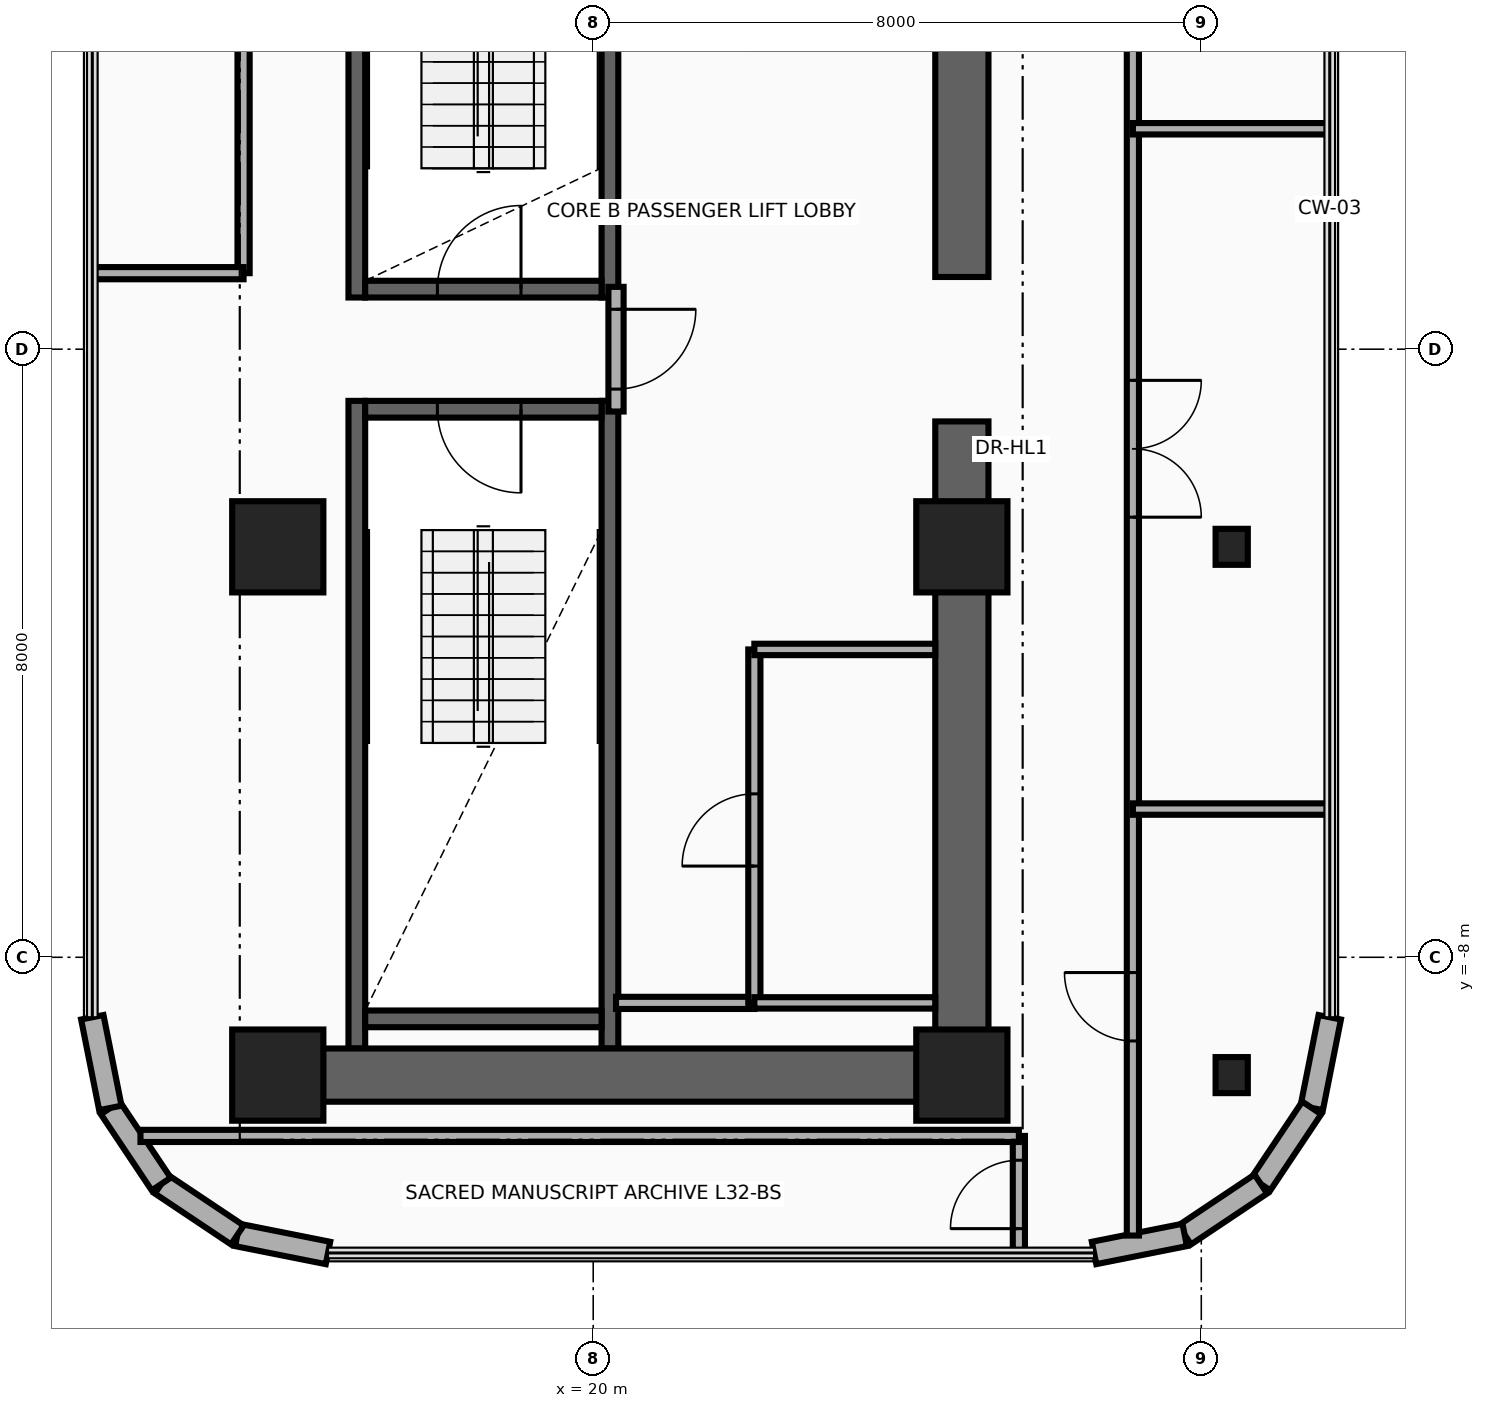
"""IFC4 building model, lengths in metres.
Left out: names, types, materials, properties, quantities, classifications, styles, units other than length and angle.
Written with IfcOpenShell. Run it as: python <this file> out.ifc"""

import sys

from ifc_helpers import new_model, si_unit, direction, frame, frame_2d, origin, origin_2d, place, context, subcontext, project, spatial, rectangle, i_section, extrude, source, transform, mapped, element, fill, save


model = new_model("IFC4")
c1 = context("Model", 3, precision=1e-05, world=origin(), true_north=direction((0.0, 1.0)))
c2 = subcontext(c1, "Body", "Model", "MODEL_VIEW")
j1 = project(units=[si_unit("LENGTHUNIT", "METRE"), si_unit("PLANEANGLEUNIT", "RADIAN")], contexts=[c1])
p1 = place(None, origin())
s1 = spatial("IfcSite", under=j1, at=p1, CompositionType="ELEMENT")
p2 = place(p1, origin())
s2 = spatial("IfcBuilding", under=s1, at=p2, CompositionType="ELEMENT")
p3 = place(p2, frame((0.0, 0.0, 127.9)))
s3 = spatial("IfcBuildingStorey", under=s2, at=p3, CompositionType="ELEMENT", Elevation=127.9)
for number, where, z_axis, x_axis in (
    (1, (16.89, 0.68, 0.0), (0.0, 0.0, 1.0), (0.0, 1.0, 0.0)),
    (2, (20.22, 0.68, 0.0), (0.0, 0.0, 1.0), (0.0, 1.0, 0.0)),
):
    element("IfcWall", number, at=place(p3, frame(where, z_axis=z_axis, x_axis=x_axis)), inside=s3, PredefinedType="SHEAR", context=c2, shape_type="SweptSolid", body=[
        extrude(rectangle(XDim=8.52, YDim=0.22, at=frame_2d((4.26, 0.0))), origin(), (0.0, 0.0, 1.0), 3.46),
    ])
p4 = place(p3, frame((17.0, 0.79, 0.0), z_axis=(0.0, 0.0, 1.0), x_axis=(1.0, 0.0, 0.0)))
e3 = element("IfcWall", 3, at=p4, inside=s3, PredefinedType="SHEAR", context=c2, shape_type="SweptSolid", body=[
    extrude(rectangle(XDim=3.11, YDim=0.22, at=frame_2d((1.555, 0.0))), origin(), (0.0, 0.0, 1.0), 3.46),
])
p5 = place(p4, frame((0.95, 0.0, 0.0)))
e4 = element("IfcOpeningElement", 4, at=p5, cuts=e3, PredefinedType="OPENING", context=c2, shape_type="SweptSolid", body=[
    extrude(rectangle(XDim=1.1, YDim=2.15, at=frame_2d((0.55, 1.075))), frame((0.0, 0.125, 0.0), z_axis=(0.0, -1.0, 0.0), x_axis=(1.0, 0.0, 0.0)), (0.0, 0.0, 1.0), 0.25),
])
for number, where, z_axis, x_axis in (
    (5, (16.89, -9.2, 0.0), (0.0, 0.0, 1.0), (0.0, 1.0, 0.0)),
    (6, (20.22, -9.2, 0.0), (0.0, 0.0, 1.0), (0.0, 1.0, 0.0)),
):
    element("IfcWall", number, at=place(p3, frame(where, z_axis=z_axis, x_axis=x_axis)), inside=s3, PredefinedType="SHEAR", context=c2, shape_type="SweptSolid", body=[
        extrude(rectangle(XDim=8.52, YDim=0.22, at=frame_2d((4.26, 0.0))), origin(), (0.0, 0.0, 1.0), 3.46),
    ])
p6 = place(p3, frame((17.0, -8.81, 0.0), z_axis=(0.0, 0.0, 1.0), x_axis=(1.0, 0.0, 0.0)))
e7 = element("IfcWall", 7, at=p6, inside=s3, PredefinedType="SHEAR", context=c2, shape_type="SweptSolid", body=[
    extrude(rectangle(XDim=3.11, YDim=0.22, at=frame_2d((1.555, 0.0))), origin(), (0.0, 0.0, 1.0), 3.46),
])
p7 = place(p3, frame((17.0, -0.79, 0.0), z_axis=(0.0, 0.0, 1.0), x_axis=(1.0, 0.0, 0.0)))
e8 = element("IfcWall", 8, at=p7, inside=s3, PredefinedType="SHEAR", context=c2, shape_type="SweptSolid", body=[
    extrude(rectangle(XDim=3.11, YDim=0.22, at=frame_2d((1.555, 0.0))), origin(), (0.0, 0.0, 1.0), 3.46),
])
p8 = place(p7, frame((0.95, 0.0, 0.0)))
e9 = element("IfcOpeningElement", 9, at=p8, cuts=e8, PredefinedType="OPENING", context=c2, shape_type="SweptSolid", body=[
    extrude(rectangle(XDim=1.1, YDim=2.15, at=frame_2d((0.55, 1.075))), frame((0.0, 0.125, 0.0), z_axis=(0.0, -1.0, 0.0), x_axis=(1.0, 0.0, 0.0)), (0.0, 0.0, 1.0), 0.25),
])
for number, where, z_axis, x_axis in (
    (10, (24.85, -9.9, 0.0), (0.0, 0.0, 1.0), (0.0, 1.0, 0.0)),
    (11, (24.85, 0.95, 0.0), (0.0, 0.0, 1.0), (0.0, 1.0, 0.0)),
):
    element("IfcWall", number, at=place(p3, frame(where, z_axis=z_axis, x_axis=x_axis)), inside=s3, PredefinedType="SHEAR", context=c2, shape_type="SweptSolid", body=[
        extrude(rectangle(XDim=8.95, YDim=0.7, at=frame_2d((4.475, 0.0))), origin(), (0.0, 0.0, 1.0), 3.46),
    ])
p9 = place(p3, frame((15.85, -9.55, 0.0), z_axis=(0.0, 0.0, 1.0), x_axis=(1.0, 0.0, 0.0)))
e12 = element("IfcWall", 12, at=p9, inside=s3, PredefinedType="SHEAR", context=c2, shape_type="SweptSolid", body=[
    extrude(rectangle(XDim=9.0, YDim=0.7, at=frame_2d((4.5, 0.0))), origin(), (0.0, 0.0, 1.0), 3.46),
])
m1 = source(origin(), c2, "Body", "SweptSolid", [
    extrude(rectangle(XDim=1.2, YDim=1.2, at=origin_2d()), origin(), (0.0, 0.0, 1.0), 3.7),
])
for number, where, z_axis, x_axis in (
    (13, (15.85, -9.55, 0.0), (0.0, 0.0, 1.0), (1.0, 0.0, 0.0)),
    (14, (24.85, -9.55, 0.0), (0.0, 0.0, 1.0), (1.0, 0.0, 0.0)),
):
    element("IfcColumn", number, at=place(p3, frame(where, z_axis=z_axis, x_axis=x_axis)), inside=s3, PredefinedType="COLUMN", context=c2, shape_type="MappedRepresentation", body=[
        mapped(m1, transform((0.0, 0.0, 0.0), x_axis=(1.0, 0.0, 0.0), y_axis=(0.0, 1.0, 0.0), z_axis=(0.0, 0.0, 1.0), scale=1.0)),
    ])
m2 = source(origin(), c2, "Body", "SweptSolid", [
    extrude(i_section(OverallWidth=0.424, OverallDepth=0.474, WebThickness=0.048, FlangeThickness=0.077, at=origin_2d()), origin(), (0.0, 0.0, 1.0), 3.7),
])
p10 = place(p3, frame((28.4, -9.55, 0.0), z_axis=(0.0, 0.0, 1.0), x_axis=(1.0, 0.0, 0.0)))
e15 = element("IfcColumn", 15, at=p10, inside=s3, PredefinedType="COLUMN", context=c2, shape_type="MappedRepresentation", body=[
    mapped(m2, transform((0.0, 0.0, 0.0), x_axis=(1.0, 0.0, 0.0), y_axis=(0.0, 1.0, 0.0), z_axis=(0.0, 0.0, 1.0), scale=1.0)),
])
for number, where, z_axis, x_axis in (
    (16, (15.85, -2.6, 0.0), (0.0, 0.0, 1.0), (1.0, 0.0, 0.0)),
    (17, (24.85, -2.6, 0.0), (0.0, 0.0, 1.0), (1.0, 0.0, 0.0)),
):
    element("IfcColumn", number, at=place(p3, frame(where, z_axis=z_axis, x_axis=x_axis)), inside=s3, PredefinedType="COLUMN", context=c2, shape_type="MappedRepresentation", body=[
        mapped(m1, transform((0.0, 0.0, 0.0), x_axis=(1.0, 0.0, 0.0), y_axis=(0.0, 1.0, 0.0), z_axis=(0.0, 0.0, 1.0), scale=1.0)),
    ])
p11 = place(p3, frame((28.4, -2.6, 0.0), z_axis=(0.0, 0.0, 1.0), x_axis=(1.0, 0.0, 0.0)))
e18 = element("IfcColumn", 18, at=p11, inside=s3, PredefinedType="COLUMN", context=c2, shape_type="MappedRepresentation", body=[
    mapped(m2, transform((0.0, 0.0, 0.0), x_axis=(1.0, 0.0, 0.0), y_axis=(0.0, 1.0, 0.0), z_axis=(0.0, 0.0, 1.0), scale=1.0)),
])
p12 = place(p3, frame((29.69, -8.789, 0.0), z_axis=(0.0, 0.0, 1.0), x_axis=(-0.194996050505, -0.980804027463, 0.0)))
e19 = element("IfcWall", 19, at=p12, inside=s3, PredefinedType="SOLIDWALL", context=c2, shape_type="SweptSolid", body=[
    extrude(rectangle(XDim=1.216, YDim=0.3, at=frame_2d((0.608, 0.0))), origin(), (0.0, 0.0, 1.0), 3.46),
])
for number, where, z_axis, x_axis in (
    (20, (29.453, -9.982, 0.0), (0.0, 0.0, 1.0), (-0.556, -0.831, 0.0)),
    (21, (28.783, -10.983, 0.0), (0.0, 0.0, 1.0), (-0.831, -0.556, 0.0)),
):
    element("IfcWall", number, at=place(p3, frame(where, z_axis=z_axis, x_axis=x_axis)), inside=s3, PredefinedType="SOLIDWALL", context=c2, shape_type="SweptSolid", body=[
        extrude(rectangle(XDim=1.205, YDim=0.3, at=frame_2d((0.603, 0.0))), origin(), (0.0, 0.0, 1.0), 3.46),
    ])
p13 = place(p3, frame((27.782, -11.653, 0.0), z_axis=(0.0, 0.0, 1.0), x_axis=(-0.980811661072, -0.194957650543, 0.0)))
e22 = element("IfcWall", 22, at=p13, inside=s3, PredefinedType="SOLIDWALL", context=c2, shape_type="SweptSolid", body=[
    extrude(rectangle(XDim=1.216, YDim=0.3, at=frame_2d((0.608, 0.0))), origin(), (0.0, 0.0, 1.0), 3.46),
])
p14 = place(p3, frame((16.511, -11.89, 0.0), z_axis=(0.0, 0.0, 1.0), x_axis=(-0.980804027463, 0.194996050505, 0.0)))
e23 = element("IfcWall", 23, at=p14, inside=s3, PredefinedType="SOLIDWALL", context=c2, shape_type="SweptSolid", body=[
    extrude(rectangle(XDim=1.216, YDim=0.3, at=frame_2d((0.608, 0.0))), origin(), (0.0, 0.0, 1.0), 3.46),
])
for number, where, z_axis, x_axis in (
    (24, (15.318, -11.653, 0.0), (0.0, 0.0, 1.0), (-0.831, 0.556, 0.0)),
    (25, (14.317, -10.983, 0.0), (0.0, 0.0, 1.0), (-0.556, 0.831, 0.0)),
):
    element("IfcWall", number, at=place(p3, frame(where, z_axis=z_axis, x_axis=x_axis)), inside=s3, PredefinedType="SOLIDWALL", context=c2, shape_type="SweptSolid", body=[
        extrude(rectangle(XDim=1.205, YDim=0.3, at=frame_2d((0.603, 0.0))), origin(), (0.0, 0.0, 1.0), 3.46),
    ])
p15 = place(p3, frame((13.647, -9.982, 0.0), z_axis=(0.0, 0.0, 1.0), x_axis=(-0.195189223115, 0.980765602568, 0.0)))
e26 = element("IfcWall", 26, at=p15, inside=s3, PredefinedType="SOLIDWALL", context=c2, shape_type="SweptSolid", body=[
    extrude(rectangle(XDim=1.216, YDim=0.3, at=frame_2d((0.608, 0.0))), origin(), (0.0, 0.0, 1.0), 3.46),
])
p16 = place(p3, frame((20.3, -0.82, 0.0), z_axis=(0.0, 0.0, 1.0), x_axis=(0.0, 1.0, 0.0)))
e27 = element("IfcWall", 27, at=p16, inside=s3, PredefinedType="PARTITIONING", context=c2, shape_type="SweptSolid", body=[
    extrude(rectangle(XDim=1.64, YDim=0.2, at=frame_2d((0.82, 0.0))), origin(), (0.0, 0.0, 1.0), 3.46),
])
p17 = place(p16, frame((0.295, 0.0, 0.0)))
e28 = element("IfcOpeningElement", 28, at=p17, cuts=e27, PredefinedType="OPENING", context=c2, shape_type="SweptSolid", body=[
    extrude(rectangle(XDim=1.05, YDim=2.15, at=frame_2d((0.525, 1.075))), frame((0.0, 0.115, 0.0), z_axis=(0.0, -1.0, 0.0), x_axis=(1.0, 0.0, 0.0)), (0.0, 0.0, 1.0), 0.23),
])
p18 = place(p3, frame((20.3, -8.6, 0.0), z_axis=(0.0, 0.0, 1.0), x_axis=(1.0, 0.0, 0.0)))
e29 = element("IfcWall", 29, at=p18, inside=s3, PredefinedType="PARTITIONING", context=c2, shape_type="SweptSolid", body=[
    extrude(rectangle(XDim=1.82, YDim=0.16, at=frame_2d((0.91, 0.0))), origin(), (0.0, 0.0, 1.0), 3.46),
])
p19 = place(p3, frame((22.12, -8.6, 0.0), z_axis=(0.0, 0.0, 1.0), x_axis=(0.0, 1.0, 0.0)))
e30 = element("IfcWall", 30, at=p19, inside=s3, PredefinedType="PARTITIONING", context=c2, shape_type="SweptSolid", body=[
    extrude(rectangle(XDim=4.65, YDim=0.16, at=frame_2d((2.325, 0.0))), origin(), (0.0, 0.0, 1.0), 3.46),
])
p20 = place(p19, frame((1.8, 0.0, 0.0)))
e31 = element("IfcOpeningElement", 31, at=p20, cuts=e30, PredefinedType="OPENING", context=c2, shape_type="SweptSolid", body=[
    extrude(rectangle(XDim=0.95, YDim=2.15, at=frame_2d((0.475, 1.075))), frame((0.0, 0.095, 0.0), z_axis=(0.0, -1.0, 0.0), x_axis=(1.0, 0.0, 0.0)), (0.0, 0.0, 1.0), 0.19),
])
for number, where, z_axis, x_axis in (
    (32, (22.12, -3.95, 0.0), (0.0, 0.0, 1.0), (1.0, 0.0, 0.0)),
    (33, (22.12, -8.6, 0.0), (0.0, 0.0, 1.0), (1.0, 0.0, 0.0)),
):
    element("IfcWall", number, at=place(p3, frame(where, z_axis=z_axis, x_axis=x_axis)), inside=s3, PredefinedType="PARTITIONING", context=c2, shape_type="SweptSolid", body=[
        extrude(rectangle(XDim=2.38, YDim=0.15, at=frame_2d((1.19, 0.0))), origin(), (0.0, 0.0, 1.0), 3.46),
    ])
p21 = place(p3, frame((25.6, -11.89, 0.0), z_axis=(0.0, 0.0, 1.0), x_axis=(0.0, 1.0, 0.0)))
e34 = element("IfcWall", 34, at=p21, inside=s3, PredefinedType="PARTITIONING", context=c2, shape_type="SweptSolid", body=[
    extrude(rectangle(XDim=1.54, YDim=0.16, at=frame_2d((0.77, 0.0))), origin(), (0.0, 0.0, 1.0), 3.46),
])
p22 = place(p21, frame((0.32, 0.0, 0.0)))
e35 = element("IfcOpeningElement", 35, at=p22, cuts=e34, PredefinedType="OPENING", context=c2, shape_type="SweptSolid", body=[
    extrude(rectangle(XDim=0.9, YDim=2.1, at=frame_2d((0.45, 1.05))), frame((0.0, 0.095, 0.0), z_axis=(0.0, -1.0, 0.0), x_axis=(1.0, 0.0, 0.0)), (0.0, 0.0, 1.0), 0.19),
])
p23 = place(p3, frame((14.044, -10.35, 0.0), z_axis=(0.0, 0.0, 1.0), x_axis=(1.0, 0.0, 0.0)))
e36 = element("IfcWall", 36, at=p23, inside=s3, PredefinedType="PARTITIONING", context=c2, shape_type="SweptSolid", body=[
    extrude(rectangle(XDim=11.556, YDim=0.16, at=frame_2d((5.778, 0.0))), origin(), (0.0, 0.0, 1.0), 3.46),
])
p24 = place(p3, frame((27.1, -11.661, 0.0), z_axis=(0.0, 0.0, 1.0), x_axis=(0.0, 1.0, 0.0)))
e37 = element("IfcWall", 37, at=p24, inside=s3, PredefinedType="PARTITIONING", context=c2, shape_type="SweptSolid", body=[
    extrude(rectangle(XDim=23.511, YDim=0.16, at=frame_2d((11.755, 0.0))), origin(), (0.0, 0.0, 1.0), 2.666),
])
p25 = place(p24, frame((2.56, 0.0, 0.0)))
e38 = element("IfcOpeningElement", 38, at=p25, cuts=e37, PredefinedType="OPENING", context=c2, shape_type="SweptSolid", body=[
    extrude(rectangle(XDim=0.9, YDim=2.1, at=frame_2d((0.45, 1.05))), frame((0.0, 0.095, 0.0), z_axis=(0.0, -1.0, 0.0), x_axis=(1.0, 0.0, 0.0)), (0.0, 0.0, 1.0), 0.19),
])
p26 = place(p24, frame((9.451, 0.0, 0.0)))
e39 = element("IfcOpeningElement", 39, at=p26, cuts=e37, PredefinedType="OPENING", context=c2, shape_type="SweptSolid", body=[
    extrude(rectangle(XDim=1.8, YDim=2.15, at=frame_2d((0.9, 1.075))), frame((0.0, 0.095, 0.0), z_axis=(0.0, -1.0, 0.0), x_axis=(1.0, 0.0, 0.0)), (0.0, 0.0, 1.0), 0.19),
])
p27 = place(p24, frame((18.136, 0.0, 0.0)))
e40 = element("IfcOpeningElement", 40, at=p27, cuts=e37, PredefinedType="OPENING", context=c2, shape_type="SweptSolid", body=[
    extrude(rectangle(XDim=1.8, YDim=2.15, at=frame_2d((0.9, 1.075))), frame((0.0, 0.095, 0.0), z_axis=(0.0, -1.0, 0.0), x_axis=(1.0, 0.0, 0.0)), (0.0, 0.0, 1.0), 0.19),
])
for number, where, z_axis, x_axis in (
    (41, (27.1, -6.05, 0.0), (0.0, 0.0, 1.0), (1.0, 0.0, 0.0)),
    (42, (27.1, 2.9, 0.0), (0.0, 0.0, 1.0), (1.0, 0.0, 0.0)),
):
    element("IfcWall", number, at=place(p3, frame(where, z_axis=z_axis, x_axis=x_axis)), inside=s3, PredefinedType="PARTITIONING", context=c2, shape_type="SweptSolid", body=[
        extrude(rectangle(XDim=2.59, YDim=0.15, at=frame_2d((1.295, 0.0))), origin(), (0.0, 0.0, 1.0), 2.896),
    ])
p28 = place(p3, frame((15.4, 1.0, 0.0), z_axis=(0.0, 0.0, 1.0), x_axis=(0.0, 1.0, 0.0)))
e43 = element("IfcWall", 43, at=p28, inside=s3, PredefinedType="PARTITIONING", context=c2, shape_type="SweptSolid", body=[
    extrude(rectangle(XDim=9.35, YDim=0.16, at=frame_2d((4.675, 0.0))), origin(), (0.0, 0.0, 1.0), 2.245),
])
p29 = place(p3, frame((13.41, 1.0, 0.0), z_axis=(0.0, 0.0, 1.0), x_axis=(1.0, 0.0, 0.0)))
e44 = element("IfcWall", 44, at=p29, inside=s3, PredefinedType="PARTITIONING", context=c2, shape_type="SweptSolid", body=[
    extrude(rectangle(XDim=1.99, YDim=0.16, at=frame_2d((0.995, 0.0))), origin(), (0.0, 0.0, 1.0), 2.245),
])
p30 = place(p17, frame((1.05, 0.0, 0.0), z_axis=(0.0, 0.0, 1.0), x_axis=(-1.0, 0.0, 0.0)))
e45 = element("IfcDoor", 45, at=p30, inside=s3, OperationType="SINGLE_SWING_LEFT", PredefinedType="DOOR", context=c2, shape_type="SweptSolid", body=[
    extrude(rectangle(XDim=1.05, YDim=2.15, at=frame_2d((0.525, 1.075))), frame((0.0, 0.025, 0.0), z_axis=(0.0, -1.0, 0.0), x_axis=(1.0, 0.0, 0.0)), (0.0, 0.0, 1.0), 0.05),
])
fill(e28, e45)
p31 = place(p5, origin())
e46 = element("IfcDoor", 46, at=p31, inside=s3, OperationType="SINGLE_SWING_RIGHT", PredefinedType="DOOR", context=c2, shape_type="SweptSolid", body=[
    extrude(rectangle(XDim=1.1, YDim=2.15, at=frame_2d((0.55, 1.075))), frame((0.0, 0.025, 0.0), z_axis=(0.0, -1.0, 0.0), x_axis=(1.0, 0.0, 0.0)), (0.0, 0.0, 1.0), 0.05),
])
fill(e4, e46)
p32 = place(p8, frame((1.1, 0.0, 0.0), z_axis=(0.0, 0.0, 1.0), x_axis=(-1.0, 0.0, 0.0)))
e47 = element("IfcDoor", 47, at=p32, inside=s3, OperationType="SINGLE_SWING_LEFT", PredefinedType="DOOR", context=c2, shape_type="SweptSolid", body=[
    extrude(rectangle(XDim=1.1, YDim=2.15, at=frame_2d((0.55, 1.075))), frame((0.0, 0.025, 0.0), z_axis=(0.0, -1.0, 0.0), x_axis=(1.0, 0.0, 0.0)), (0.0, 0.0, 1.0), 0.05),
])
fill(e9, e47)
p33 = place(p20, origin())
e48 = element("IfcDoor", 48, at=p33, inside=s3, OperationType="SINGLE_SWING_LEFT", PredefinedType="DOOR", context=c2, shape_type="SweptSolid", body=[
    extrude(rectangle(XDim=0.95, YDim=2.15, at=frame_2d((0.475, 1.075))), frame((0.0, 0.025, 0.0), z_axis=(0.0, -1.0, 0.0), x_axis=(1.0, 0.0, 0.0)), (0.0, 0.0, 1.0), 0.05),
])
fill(e31, e48)
p34 = place(p22, origin())
e49 = element("IfcDoor", 49, at=p34, inside=s3, OperationType="SINGLE_SWING_RIGHT", PredefinedType="DOOR", context=c2, shape_type="SweptSolid", body=[
    extrude(rectangle(XDim=0.9, YDim=2.1, at=frame_2d((0.45, 1.05))), frame((0.0, 0.025, 0.0), z_axis=(0.0, -1.0, 0.0), x_axis=(1.0, 0.0, 0.0)), (0.0, 0.0, 1.0), 0.05),
])
fill(e35, e49)
p35 = place(p25, origin())
e50 = element("IfcDoor", 50, at=p35, inside=s3, OperationType="SINGLE_SWING_RIGHT", PredefinedType="DOOR", context=c2, shape_type="SweptSolid", body=[
    extrude(rectangle(XDim=0.9, YDim=2.1, at=frame_2d((0.45, 1.05))), frame((0.0, 0.025, 0.0), z_axis=(0.0, -1.0, 0.0), x_axis=(1.0, 0.0, 0.0)), (0.0, 0.0, 1.0), 0.05),
])
fill(e38, e50)
p36 = place(p26, frame((1.8, 0.0, 0.0), z_axis=(0.0, 0.0, 1.0), x_axis=(-1.0, 0.0, 0.0)))
e51 = element("IfcDoor", 51, at=p36, inside=s3, OperationType="DOUBLE_DOOR_SINGLE_SWING", PredefinedType="DOOR", context=c2, shape_type="SweptSolid", body=[
    extrude(rectangle(XDim=1.8, YDim=2.15, at=frame_2d((0.9, 1.075))), frame((0.0, 0.025, 0.0), z_axis=(0.0, -1.0, 0.0), x_axis=(1.0, 0.0, 0.0)), (0.0, 0.0, 1.0), 0.05),
])
fill(e39, e51)
save(model, sys.argv[1])
